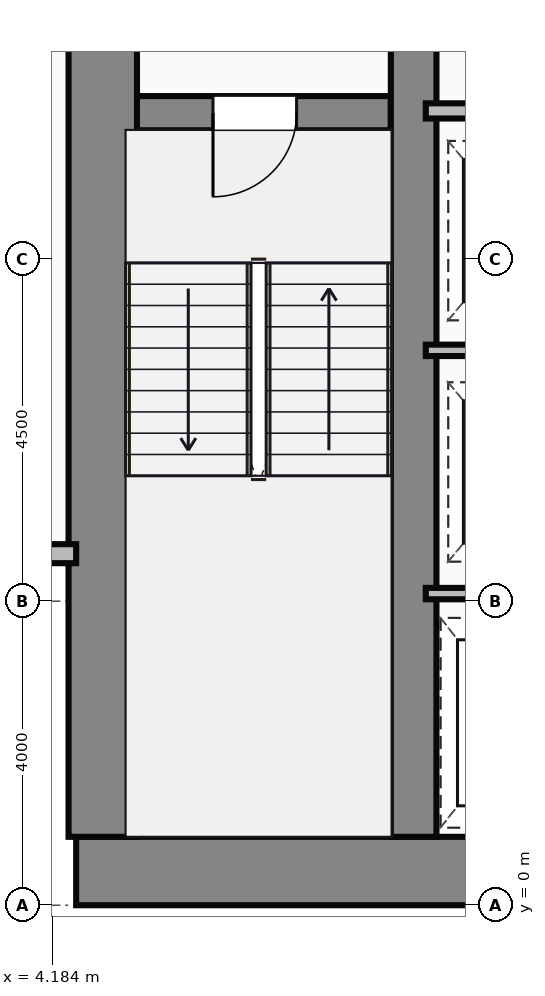
"""IFC4 building model, lengths in metres.
Left out: names, types, materials, properties, quantities, classifications, styles, units other than length and angle.
Written with IfcOpenShell. Run it as: python <this file> out.ifc"""

import sys

from ifc_helpers import new_model, si_unit, direction, frame, frame_2d, origin, place, context, subcontext, project, spatial, rectangle, extrude, source, transform, mapped, element, fill, save


model = new_model("IFC4")
c1 = context("Model", 3, precision=1e-05, world=origin(), true_north=direction((0.0, 1.0)))
c2 = subcontext(c1, "Body", "Model", "MODEL_VIEW")
j1 = project(units=[si_unit("LENGTHUNIT", "METRE"), si_unit("PLANEANGLEUNIT", "RADIAN")], contexts=[c1])
p1 = place(None, origin())
s1 = spatial("IfcSite", under=j1, at=p1, CompositionType="ELEMENT")
p2 = place(p1, origin())
s2 = spatial("IfcBuilding", under=s1, at=p2, CompositionType="ELEMENT")
p3 = place(p2, frame((0.0, 0.0, 39.8)))
s3 = spatial("IfcBuildingStorey", under=s2, at=p3, CompositionType="ELEMENT", Elevation=39.8)
m1 = source(origin(), c2, "Body", "SweptSolid", [
    extrude(rectangle(XDim=29.5, YDim=0.9, at=frame_2d((14.75, 0.0))), origin(), (0.0, 0.0, 1.0), 3.65),
])
p4 = place(p3, frame((4.5, 0.45, 0.0), z_axis=(0.0, 0.0, 1.0), x_axis=(1.0, 0.0, 0.0)))
e1 = element("IfcWall", 1, at=p4, inside=s3, PredefinedType="SHEAR", context=c2, shape_type="MappedRepresentation", body=[
    mapped(m1, transform((0.0, 0.0, 0.0))),
])
m2 = source(origin(), c2, "Body", "SweptSolid", [
    extrude(rectangle(XDim=13.1, YDim=0.9, at=frame_2d((6.55, 0.0))), origin(), (0.0, 0.0, 1.0), 3.65),
])
p5 = place(p3, frame((4.85, 0.9, 0.0), z_axis=(0.0, 0.0, 1.0), x_axis=(0.0, 1.0, 0.0)))
e2 = element("IfcWall", 2, at=p5, inside=s3, PredefinedType="SHEAR", context=c2, shape_type="MappedRepresentation", body=[
    mapped(m2, transform((0.0, 0.0, 0.0))),
])
m3 = source(origin(), c2, "Body", "SweptSolid", [
    extrude(rectangle(XDim=12.2, YDim=0.6, at=frame_2d((6.1, 0.0))), origin(), (0.0, 0.0, 1.0), 3.65),
])
p6 = place(p3, frame((8.94, 0.9, 0.0), z_axis=(0.0, 0.0, 1.0), x_axis=(0.0, 1.0, 0.0)))
e3 = element("IfcWall", 3, at=p6, inside=s3, PredefinedType="SHEAR", context=c2, shape_type="MappedRepresentation", body=[
    mapped(m3, transform((0.0, 0.0, 0.0))),
])
m4 = source(origin(), c2, "Body", "SweptSolid", [
    extrude(rectangle(XDim=3.39, YDim=0.45, at=frame_2d((1.695, 0.0))), origin(), (0.0, 0.0, 1.0), 3.65),
])
p7 = place(p3, frame((5.25, 10.42, 0.0), z_axis=(0.0, 0.0, 1.0), x_axis=(1.0, 0.0, 0.0)))
e4 = element("IfcWall", 4, at=p7, inside=s3, PredefinedType="SHEAR", context=c2, shape_type="MappedRepresentation", body=[
    mapped(m4, transform((0.0, 0.0, 0.0))),
])
p8 = place(p7, frame((1.05, 0.0, 0.0)))
e5 = element("IfcOpeningElement", 5, at=p8, cuts=e4, PredefinedType="OPENING", context=c2, shape_type="SweptSolid", body=[
    extrude(rectangle(XDim=1.1, YDim=2.15, at=frame_2d((0.55, 1.075))), frame((0.0, 0.235, 0.0), z_axis=(0.0, -1.0, 0.0), x_axis=(1.0, 0.0, 0.0)), (0.0, 0.0, 1.0), 0.47),
])
m5 = source(origin(), c2, "Body", "SweptSolid", [
    extrude(rectangle(XDim=4.5, YDim=0.25, at=frame_2d((2.25, 0.0))), origin(), (0.0, 0.0, 1.0), 3.4),
])
p9 = place(p3, frame((0.0, 4.625, 0.0), z_axis=(0.0, 0.0, 1.0), x_axis=(1.0, 0.0, 0.0)))
e6 = element("IfcWall", 6, at=p9, inside=s3, PredefinedType="STANDARD", context=c2, shape_type="MappedRepresentation", body=[
    mapped(m5, transform((0.0, 0.0, 0.0))),
])
m6 = source(origin(), c2, "Body", "SweptSolid", [
    extrude(rectangle(XDim=2.35, YDim=0.2, at=frame_2d((1.175, 0.0))), origin(), (0.0, 0.0, 1.0), 3.4),
])
p10 = place(p3, frame((9.1, 10.45, 0.0), z_axis=(0.0, 0.0, 1.0), x_axis=(1.0, 0.0, 0.0)))
e7 = element("IfcWall", 7, at=p10, inside=s3, PredefinedType="PARTITIONING", context=c2, shape_type="MappedRepresentation", body=[
    mapped(m6, transform((0.0, 0.0, 0.0))),
])
p11 = place(p10, frame((0.55, 0.0, 0.0)))
e8 = element("IfcOpeningElement", 8, at=p11, cuts=e7, PredefinedType="OPENING", context=c2, shape_type="SweptSolid", body=[
    extrude(rectangle(XDim=1.1, YDim=2.15, at=frame_2d((0.55, 1.075))), frame((0.0, 0.11, 0.0), z_axis=(0.0, -1.0, 0.0), x_axis=(1.0, 0.0, 0.0)), (0.0, 0.0, 1.0), 0.22),
])
m7 = source(origin(), c2, "Body", "SweptSolid", [
    extrude(rectangle(XDim=2.4, YDim=0.15, at=frame_2d((1.2, 0.0))), origin(), (0.0, 0.0, 1.0), 3.4),
])
for number, where, z_axis, x_axis in (
    (9, (9.1, 4.1, 0.0), (0.0, 0.0, 1.0), (1.0, 0.0, 0.0)),
    (10, (9.1, 7.3, 0.0), (0.0, 0.0, 1.0), (1.0, 0.0, 0.0)),
):
    element("IfcWall", number, at=place(p3, frame(where, z_axis=z_axis, x_axis=x_axis)), inside=s3, PredefinedType="PARTITIONING", context=c2, shape_type="MappedRepresentation", body=[
        mapped(m7, transform((0.0, 0.0, 0.0))),
    ])
m8 = source(origin(), c2, "Body", "SweptSolid", [
    extrude(rectangle(XDim=1.1, YDim=2.15, at=frame_2d((0.55, 1.075))), frame((0.0, 0.025, 0.0), z_axis=(0.0, -1.0, 0.0), x_axis=(1.0, 0.0, 0.0)), (0.0, 0.0, 1.0), 0.05),
])
p12 = place(p8, frame((1.1, 0.0, 0.0), z_axis=(0.0, 0.0, 1.0), x_axis=(-1.0, 0.0, 0.0)))
e11 = element("IfcDoor", 11, at=p12, inside=s3, OperationType="SINGLE_SWING_LEFT", PredefinedType="DOOR", context=c2, shape_type="MappedRepresentation", body=[
    mapped(m8, transform((0.0, 0.0, 0.0))),
])
fill(e5, e11)
save(model, sys.argv[1])
